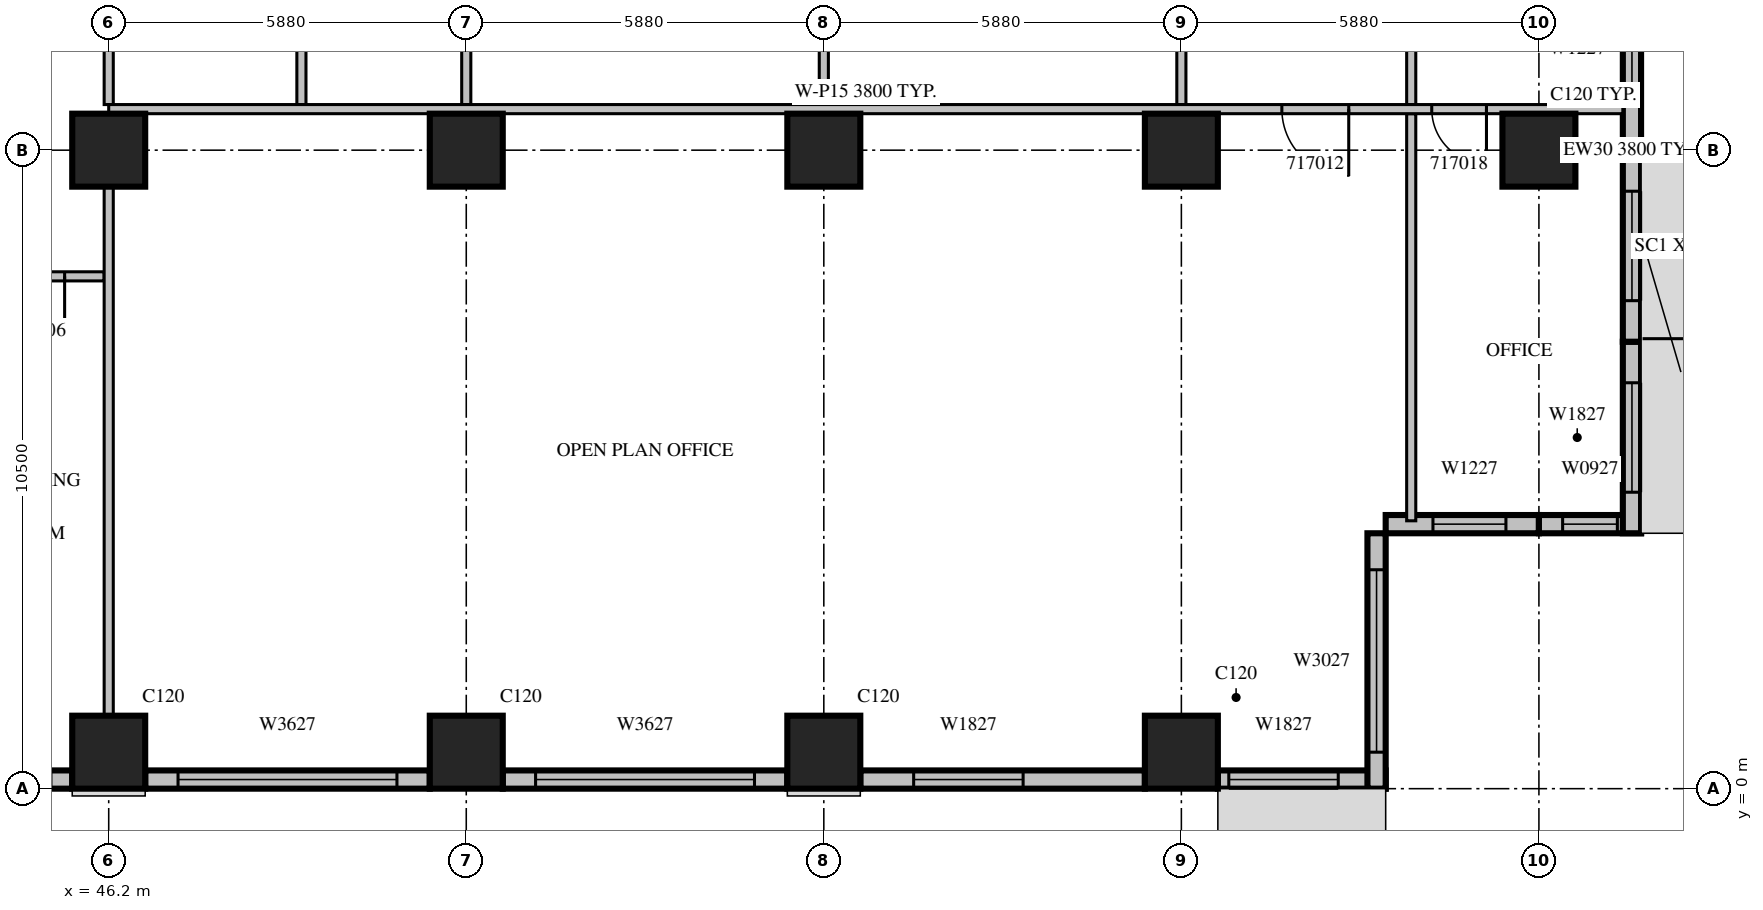
"""IFC4 building model, lengths in metres.
Left out: names, types, materials, properties, quantities, classifications, styles, units other than length and angle.
Written with IfcOpenShell. Run it as: python <this file> out.ifc"""

import sys

from ifc_helpers import new_model, si_unit, direction, frame, frame_2d, origin, origin_2d, place, context, subcontext, project, spatial, rectangle, extrude, source, transform, mapped, element, fill, save


model = new_model("IFC4")
c1 = context("Model", 3, precision=1e-05, world=origin(), true_north=direction((0.0, 1.0)))
c2 = subcontext(c1, "Body", "Model", "MODEL_VIEW")
j1 = project(units=[si_unit("LENGTHUNIT", "METRE"), si_unit("PLANEANGLEUNIT", "RADIAN")], contexts=[c1])
p1 = place(None, origin())
s1 = spatial("IfcSite", under=j1, at=p1, CompositionType="ELEMENT")
p2 = place(p1, origin())
s2 = spatial("IfcBuilding", under=s1, at=p2, CompositionType="ELEMENT")
p3 = place(p2, frame((0.0, 0.0, 82.5)))
s3 = spatial("IfcBuildingStorey", under=s2, at=p3, CompositionType="ELEMENT", Elevation=82.5)
m1 = source(origin(), c2, "Body", "SweptSolid", [
    extrude(rectangle(XDim=1.2, YDim=1.2, at=origin_2d()), origin(), (0.0, 0.0, 1.0), 4.2),
])
for number, where, z_axis, x_axis in (
    (1, (46.2, 0.6, 0.0), (0.0, 0.0, 1.0), (1.0, 0.0, 0.0)),
    (2, (52.08, 0.6, 0.0), (0.0, 0.0, 1.0), (1.0, 0.0, 0.0)),
    (3, (57.96, 0.6, 0.0), (0.0, 0.0, 1.0), (1.0, 0.0, 0.0)),
    (4, (63.84, 0.6, 0.0), (0.0, 0.0, 1.0), (1.0, 0.0, 0.0)),
    (5, (46.2, 10.5, 0.0), (0.0, 0.0, 1.0), (1.0, 0.0, 0.0)),
    (6, (52.08, 10.5, 0.0), (0.0, 0.0, 1.0), (1.0, 0.0, 0.0)),
    (7, (57.96, 10.5, 0.0), (0.0, 0.0, 1.0), (1.0, 0.0, 0.0)),
    (8, (63.84, 10.5, 0.0), (0.0, 0.0, 1.0), (1.0, 0.0, 0.0)),
    (9, (69.72, 10.5, 0.0), (0.0, 0.0, 1.0), (1.0, 0.0, 0.0)),
):
    element("IfcColumn", number, at=place(p3, frame(where, z_axis=z_axis, x_axis=x_axis)), inside=s3, PredefinedType="COLUMN", context=c2, shape_type="MappedRepresentation", body=[
        mapped(m1, transform((0.0, 0.0, 0.0), scale=1.0)),
    ])
m2 = source(origin(), c2, "Body", "SweptSolid", [
    extrude(rectangle(XDim=1.6, YDim=0.3, at=frame_2d((0.8, 0.0))), origin(), (0.0, 0.0, 1.0), 3.8),
])
p4 = place(p3, frame((44.0, 0.15, 0.0), z_axis=(0.0, 0.0, 1.0), x_axis=(1.0, 0.0, 0.0)))
e10 = element("IfcWall", 10, at=p4, inside=s3, PredefinedType="STANDARD", context=c2, shape_type="MappedRepresentation", body=[
    mapped(m2, transform((0.0, 0.0, 0.0), scale=1.0)),
])
m3 = source(origin(), c2, "Body", "SweptSolid", [
    extrude(rectangle(XDim=0.9, YDim=2.7, at=frame_2d((0.45, 1.35))), frame((0.0, 0.16, 0.0), z_axis=(0.0, -1.0, 0.0), x_axis=(1.0, 0.0, 0.0)), (0.0, 0.0, 1.0), 0.32),
])
p5 = place(p4, frame((0.35, 0.0, 0.6)))
e11 = element("IfcOpeningElement", 11, at=p5, cuts=e10, PredefinedType="OPENING", context=c2, shape_type="MappedRepresentation", body=[
    mapped(m3, transform((0.0, 0.0, 0.0), scale=1.0)),
])
m4 = source(origin(), c2, "Body", "SweptSolid", [
    extrude(rectangle(XDim=4.68, YDim=0.3, at=frame_2d((2.34, 0.0))), origin(), (0.0, 0.0, 1.0), 3.8),
])
p6 = place(p3, frame((46.8, 0.15, 0.0), z_axis=(0.0, 0.0, 1.0), x_axis=(1.0, 0.0, 0.0)))
e12 = element("IfcWall", 12, at=p6, inside=s3, PredefinedType="STANDARD", context=c2, shape_type="MappedRepresentation", body=[
    mapped(m4, transform((0.0, 0.0, 0.0), scale=1.0)),
])
m5 = source(origin(), c2, "Body", "SweptSolid", [
    extrude(rectangle(XDim=3.6, YDim=2.7, at=frame_2d((1.8, 1.35))), frame((0.0, 0.16, 0.0), z_axis=(0.0, -1.0, 0.0), x_axis=(1.0, 0.0, 0.0)), (0.0, 0.0, 1.0), 0.32),
])
p7 = place(p6, frame((0.54, 0.0, 0.6)))
e13 = element("IfcOpeningElement", 13, at=p7, cuts=e12, PredefinedType="OPENING", context=c2, shape_type="MappedRepresentation", body=[
    mapped(m5, transform((0.0, 0.0, 0.0), scale=1.0)),
])
p8 = place(p3, frame((52.68, 0.15, 0.0), z_axis=(0.0, 0.0, 1.0), x_axis=(1.0, 0.0, 0.0)))
e14 = element("IfcWall", 14, at=p8, inside=s3, PredefinedType="STANDARD", context=c2, shape_type="MappedRepresentation", body=[
    mapped(m4, transform((0.0, 0.0, 0.0), scale=1.0)),
])
p9 = place(p8, frame((0.54, 0.0, 0.6)))
e15 = element("IfcOpeningElement", 15, at=p9, cuts=e14, PredefinedType="OPENING", context=c2, shape_type="MappedRepresentation", body=[
    mapped(m5, transform((0.0, 0.0, 0.0), scale=1.0)),
])
p10 = place(p3, frame((58.56, 0.15, 0.0), z_axis=(0.0, 0.0, 1.0), x_axis=(1.0, 0.0, 0.0)))
e16 = element("IfcWall", 16, at=p10, inside=s3, PredefinedType="STANDARD", context=c2, shape_type="MappedRepresentation", body=[
    mapped(m4, transform((0.0, 0.0, 0.0), scale=1.0)),
])
m6 = source(origin(), c2, "Body", "SweptSolid", [
    extrude(rectangle(XDim=1.8, YDim=2.7, at=frame_2d((0.9, 1.35))), frame((0.0, 0.16, 0.0), z_axis=(0.0, -1.0, 0.0), x_axis=(1.0, 0.0, 0.0)), (0.0, 0.0, 1.0), 0.32),
])
p11 = place(p10, frame((0.877, 0.0, 0.6)))
e17 = element("IfcOpeningElement", 17, at=p11, cuts=e16, PredefinedType="OPENING", context=c2, shape_type="MappedRepresentation", body=[
    mapped(m6, transform((0.0, 0.0, 0.0), scale=1.0)),
])
m7 = source(origin(), c2, "Body", "SweptSolid", [
    extrude(rectangle(XDim=2.76, YDim=0.3, at=frame_2d((1.38, 0.0))), origin(), (0.0, 0.0, 1.0), 3.8),
])
p12 = place(p3, frame((64.44, 0.15, 0.0), z_axis=(0.0, 0.0, 1.0), x_axis=(1.0, 0.0, 0.0)))
e18 = element("IfcWall", 18, at=p12, inside=s3, PredefinedType="STANDARD", context=c2, shape_type="MappedRepresentation", body=[
    mapped(m7, transform((0.0, 0.0, 0.0), scale=1.0)),
])
p13 = place(p12, frame((0.18, 0.0, 0.6)))
e19 = element("IfcOpeningElement", 19, at=p13, cuts=e18, PredefinedType="OPENING", context=c2, shape_type="MappedRepresentation", body=[
    mapped(m6, transform((0.0, 0.0, 0.0), scale=1.0)),
])
m8 = source(origin(), c2, "Body", "SweptSolid", [
    extrude(rectangle(XDim=4.2, YDim=0.3, at=frame_2d((2.1, 0.0))), origin(), (0.0, 0.0, 1.0), 3.8),
])
p14 = place(p3, frame((67.05, 0.0, 0.0), z_axis=(0.0, 0.0, 1.0), x_axis=(0.0, 1.0, 0.0)))
e20 = element("IfcWall", 20, at=p14, inside=s3, PredefinedType="STANDARD", context=c2, shape_type="MappedRepresentation", body=[
    mapped(m8, transform((0.0, 0.0, 0.0), scale=1.0)),
])
m9 = source(origin(), c2, "Body", "SweptSolid", [
    extrude(rectangle(XDim=3.0, YDim=2.7, at=frame_2d((1.5, 1.35))), frame((0.0, 0.16, 0.0), z_axis=(0.0, -1.0, 0.0), x_axis=(1.0, 0.0, 0.0)), (0.0, 0.0, 1.0), 0.32),
])
p15 = place(p14, frame((0.6, 0.0, 0.6)))
e21 = element("IfcOpeningElement", 21, at=p15, cuts=e20, PredefinedType="OPENING", context=c2, shape_type="MappedRepresentation", body=[
    mapped(m9, transform((0.0, 0.0, 0.0), scale=1.0)),
])
m10 = source(origin(), c2, "Body", "SweptSolid", [
    extrude(rectangle(XDim=2.52, YDim=0.3, at=frame_2d((1.26, 0.0))), origin(), (0.0, 0.0, 1.0), 3.8),
])
p16 = place(p3, frame((67.2, 4.35, 0.0), z_axis=(0.0, 0.0, 1.0), x_axis=(1.0, 0.0, 0.0)))
e22 = element("IfcWall", 22, at=p16, inside=s3, PredefinedType="STANDARD", context=c2, shape_type="MappedRepresentation", body=[
    mapped(m10, transform((0.0, 0.0, 0.0), scale=1.0)),
])
m11 = source(origin(), c2, "Body", "SweptSolid", [
    extrude(rectangle(XDim=1.2, YDim=2.7, at=frame_2d((0.6, 1.35))), frame((0.0, 0.16, 0.0), z_axis=(0.0, -1.0, 0.0), x_axis=(1.0, 0.0, 0.0)), (0.0, 0.0, 1.0), 0.32),
])
p17 = place(p16, frame((0.777, 0.0, 0.6)))
e23 = element("IfcOpeningElement", 23, at=p17, cuts=e22, PredefinedType="OPENING", context=c2, shape_type="MappedRepresentation", body=[
    mapped(m11, transform((0.0, 0.0, 0.0), scale=1.0)),
])
m12 = source(origin(), c2, "Body", "SweptSolid", [
    extrude(rectangle(XDim=1.68, YDim=0.3, at=frame_2d((0.84, 0.0))), origin(), (0.0, 0.0, 1.0), 3.8),
])
p18 = place(p3, frame((69.72, 4.35, 0.0), z_axis=(0.0, 0.0, 1.0), x_axis=(1.0, 0.0, 0.0)))
e24 = element("IfcWall", 24, at=p18, inside=s3, PredefinedType="STANDARD", context=c2, shape_type="MappedRepresentation", body=[
    mapped(m12, transform((0.0, 0.0, 0.0), scale=1.0)),
])
p19 = place(p18, frame((0.39, 0.0, 0.6)))
e25 = element("IfcOpeningElement", 25, at=p19, cuts=e24, PredefinedType="OPENING", context=c2, shape_type="MappedRepresentation", body=[
    mapped(m3, transform((0.0, 0.0, 0.0), scale=1.0)),
])
m13 = source(origin(), c2, "Body", "SweptSolid", [
    extrude(rectangle(XDim=3.15, YDim=0.3, at=frame_2d((1.575, 0.0))), origin(), (0.0, 0.0, 1.0), 3.8),
])
p20 = place(p3, frame((71.25, 4.2, 0.0), z_axis=(0.0, 0.0, 1.0), x_axis=(0.0, 1.0, 0.0)))
e26 = element("IfcWall", 26, at=p20, inside=s3, PredefinedType="STANDARD", context=c2, shape_type="MappedRepresentation", body=[
    mapped(m13, transform((0.0, 0.0, 0.0), scale=1.0)),
])
p21 = place(p20, frame((0.675, 0.0, 0.6)))
e27 = element("IfcOpeningElement", 27, at=p21, cuts=e26, PredefinedType="OPENING", context=c2, shape_type="MappedRepresentation", body=[
    mapped(m6, transform((0.0, 0.0, 0.0), scale=1.0)),
])
p22 = place(p3, frame((71.25, 7.35, 0.0), z_axis=(0.0, 0.0, 1.0), x_axis=(0.0, 1.0, 0.0)))
e28 = element("IfcWall", 28, at=p22, inside=s3, PredefinedType="STANDARD", context=c2, shape_type="MappedRepresentation", body=[
    mapped(m13, transform((0.0, 0.0, 0.0), scale=1.0)),
])
m14 = source(origin(), c2, "Body", "SweptSolid", [
    extrude(rectangle(XDim=1.8, YDim=2.4, at=frame_2d((0.9, 1.2))), frame((0.0, 0.16, 0.0), z_axis=(0.0, -1.0, 0.0), x_axis=(1.0, 0.0, 0.0)), (0.0, 0.0, 1.0), 0.32),
])
p23 = place(p22, frame((0.675, 0.0, 0.0)))
e29 = element("IfcOpeningElement", 29, at=p23, cuts=e28, PredefinedType="OPENING", context=c2, shape_type="MappedRepresentation", body=[
    mapped(m14, transform((0.0, 0.0, 0.0), scale=1.0)),
])
m15 = source(origin(), c2, "Body", "SweptSolid", [
    extrude(rectangle(XDim=6.3, YDim=0.3, at=frame_2d((3.15, 0.0))), origin(), (0.0, 0.0, 1.0), 3.8),
])
p24 = place(p3, frame((71.25, 10.5, 0.0), z_axis=(0.0, 0.0, 1.0), x_axis=(0.0, 1.0, 0.0)))
e30 = element("IfcWall", 30, at=p24, inside=s3, PredefinedType="STANDARD", context=c2, shape_type="MappedRepresentation", body=[
    mapped(m15, transform((0.0, 0.0, 0.0), scale=1.0)),
])
p25 = place(p24, frame((1.062, 0.0, 0.6)))
e31 = element("IfcOpeningElement", 31, at=p25, cuts=e30, PredefinedType="OPENING", context=c2, shape_type="MappedRepresentation", body=[
    mapped(m11, transform((0.0, 0.0, 0.0), scale=1.0)),
])
m16 = source(origin(), c2, "Body", "SweptSolid", [
    extrude(rectangle(XDim=2.2, YDim=0.15, at=frame_2d((1.1, 0.0))), origin(), (0.0, 0.0, 1.0), 3.8),
])
p26 = place(p3, frame((46.125, 8.425, 0.0), z_axis=(0.0, 0.0, 1.0), x_axis=(-1.0, 0.0, 0.0)))
e32 = element("IfcWall", 32, at=p26, inside=s3, PredefinedType="PARTITIONING", context=c2, shape_type="MappedRepresentation", body=[
    mapped(m16, transform((0.0, 0.0, 0.0), scale=1.0)),
])
m17 = source(origin(), c2, "Body", "SweptSolid", [
    extrude(rectangle(XDim=0.9, YDim=2.1, at=frame_2d((0.45, 1.05))), frame((0.0, 0.085, 0.0), z_axis=(0.0, -1.0, 0.0), x_axis=(1.0, 0.0, 0.0)), (0.0, 0.0, 1.0), 0.17),
])
p27 = place(p26, frame((0.65, 0.0, 0.0)))
e33 = element("IfcOpeningElement", 33, at=p27, cuts=e32, PredefinedType="OPENING", context=c2, shape_type="MappedRepresentation", body=[
    mapped(m17, transform((0.0, 0.0, 0.0), scale=1.0)),
])
m18 = source(origin(), c2, "Body", "SweptSolid", [
    extrude(rectangle(XDim=3.45, YDim=0.15, at=frame_2d((1.725, 0.0))), origin(), (0.0, 0.0, 1.0), 3.8),
])
for number, where, z_axis, x_axis in (
    (34, (49.369, 11.25, 0.0), (0.0, 0.0, 1.0), (0.0, 1.0, 0.0)),
    (35, (52.08, 11.25, 0.0), (0.0, 0.0, 1.0), (0.0, 1.0, 0.0)),
    (36, (57.96, 11.25, 0.0), (0.0, 0.0, 1.0), (0.0, 1.0, 0.0)),
    (37, (63.84, 11.25, 0.0), (0.0, 0.0, 1.0), (0.0, 1.0, 0.0)),
):
    element("IfcWall", number, at=place(p3, frame(where, z_axis=z_axis, x_axis=x_axis)), inside=s3, PredefinedType="PARTITIONING", context=c2, shape_type="MappedRepresentation", body=[
        mapped(m18, transform((0.0, 0.0, 0.0), scale=1.0)),
    ])
m19 = source(origin(), c2, "Body", "SweptSolid", [
    extrude(rectangle(XDim=8.702, YDim=0.15, at=frame_2d((4.351, 0.0))), origin(), (0.0, 0.0, 1.0), 3.8),
])
p28 = place(p3, frame((46.2, 1.199, 0.0), z_axis=(0.0, 0.0, 1.0), x_axis=(0.0, 1.0, 0.0)))
e38 = element("IfcWall", 38, at=p28, inside=s3, PredefinedType="PARTITIONING", context=c2, shape_type="MappedRepresentation", body=[
    mapped(m19, transform((0.0, 0.0, 0.0), scale=1.0)),
])
p29 = place(p3, frame((46.2, 11.25, 0.0), z_axis=(0.0, 0.0, 1.0), x_axis=(0.0, 1.0, 0.0)))
e39 = element("IfcWall", 39, at=p29, inside=s3, PredefinedType="PARTITIONING", context=c2, shape_type="MappedRepresentation", body=[
    mapped(m18, transform((0.0, 0.0, 0.0), scale=1.0)),
])
m20 = source(origin(), c2, "Body", "SweptSolid", [
    extrude(rectangle(XDim=6.695, YDim=0.15, at=frame_2d((3.348, 0.0))), origin(), (0.0, 0.0, 1.0), 3.8),
])
p30 = place(p3, frame((67.62, 4.405, 0.0), z_axis=(0.0, 0.0, 1.0), x_axis=(0.0, 1.0, 0.0)))
e40 = element("IfcWall", 40, at=p30, inside=s3, PredefinedType="PARTITIONING", context=c2, shape_type="MappedRepresentation", body=[
    mapped(m20, transform((0.0, 0.0, 0.0), scale=1.0)),
])
p31 = place(p3, frame((67.62, 11.25, 0.0), z_axis=(0.0, 0.0, 1.0), x_axis=(0.0, 1.0, 0.0)))
e41 = element("IfcWall", 41, at=p31, inside=s3, PredefinedType="PARTITIONING", context=c2, shape_type="MappedRepresentation", body=[
    mapped(m18, transform((0.0, 0.0, 0.0), scale=1.0)),
])
m21 = source(origin(), c2, "Body", "SweptSolid", [
    extrude(rectangle(XDim=24.9, YDim=0.15, at=frame_2d((12.45, 0.0))), origin(), (0.0, 0.0, 1.0), 3.8),
])
p32 = place(p3, frame((71.1, 11.175, 0.0), z_axis=(0.0, 0.0, 1.0), x_axis=(-1.0, 0.0, 0.0)))
e42 = element("IfcWall", 42, at=p32, inside=s3, PredefinedType="PARTITIONING", context=c2, shape_type="MappedRepresentation", body=[
    mapped(m21, transform((0.0, 0.0, 0.0), scale=1.0)),
])
m22 = source(origin(), c2, "Body", "SweptSolid", [
    extrude(rectangle(XDim=1.1, YDim=2.1, at=frame_2d((0.55, 1.05))), frame((0.0, 0.085, 0.0), z_axis=(0.0, -1.0, 0.0), x_axis=(1.0, 0.0, 0.0)), (0.0, 0.0, 1.0), 0.17),
])
p33 = place(p32, frame((4.508, 0.0, 0.0)))
e43 = element("IfcOpeningElement", 43, at=p33, cuts=e42, PredefinedType="OPENING", context=c2, shape_type="MappedRepresentation", body=[
    mapped(m22, transform((0.0, 0.0, 0.0), scale=1.0)),
])
p34 = place(p32, frame((2.243, 0.0, 0.0)))
e44 = element("IfcOpeningElement", 44, at=p34, cuts=e42, PredefinedType="OPENING", context=c2, shape_type="MappedRepresentation", body=[
    mapped(m17, transform((0.0, 0.0, 0.0), scale=1.0)),
])
m23 = source(origin(), c2, "Body", "SweptSolid", [
    extrude(rectangle(XDim=3.6, YDim=2.7, at=frame_2d((1.8, 1.35))), frame((0.0, 0.03, 0.0), z_axis=(0.0, -1.0, 0.0), x_axis=(1.0, 0.0, 0.0)), (0.0, 0.0, 1.0), 0.06),
])
p35 = place(p7, origin())
e45 = element("IfcWindow", 45, at=p35, inside=s3, PartitioningType="SINGLE_PANEL", PredefinedType="WINDOW", context=c2, shape_type="MappedRepresentation", body=[
    mapped(m23, transform((0.0, 0.0, 0.0), scale=1.0)),
])
fill(e13, e45)
p36 = place(p9, origin())
e46 = element("IfcWindow", 46, at=p36, inside=s3, PartitioningType="SINGLE_PANEL", PredefinedType="WINDOW", context=c2, shape_type="MappedRepresentation", body=[
    mapped(m23, transform((0.0, 0.0, 0.0), scale=1.0)),
])
fill(e15, e46)
m24 = source(origin(), c2, "Body", "SweptSolid", [
    extrude(rectangle(XDim=1.8, YDim=2.7, at=frame_2d((0.9, 1.35))), frame((0.0, 0.03, 0.0), z_axis=(0.0, -1.0, 0.0), x_axis=(1.0, 0.0, 0.0)), (0.0, 0.0, 1.0), 0.06),
])
p37 = place(p11, origin())
e47 = element("IfcWindow", 47, at=p37, inside=s3, PartitioningType="SINGLE_PANEL", PredefinedType="WINDOW", context=c2, shape_type="MappedRepresentation", body=[
    mapped(m24, transform((0.0, 0.0, 0.0), scale=1.0)),
])
fill(e17, e47)
p38 = place(p13, origin())
e48 = element("IfcWindow", 48, at=p38, inside=s3, PartitioningType="SINGLE_PANEL", PredefinedType="WINDOW", context=c2, shape_type="MappedRepresentation", body=[
    mapped(m24, transform((0.0, 0.0, 0.0), scale=1.0)),
])
fill(e19, e48)
m25 = source(origin(), c2, "Body", "SweptSolid", [
    extrude(rectangle(XDim=3.0, YDim=2.7, at=frame_2d((1.5, 1.35))), frame((0.0, 0.03, 0.0), z_axis=(0.0, -1.0, 0.0), x_axis=(1.0, 0.0, 0.0)), (0.0, 0.0, 1.0), 0.06),
])
p39 = place(p15, origin())
e49 = element("IfcWindow", 49, at=p39, inside=s3, PartitioningType="SINGLE_PANEL", PredefinedType="WINDOW", context=c2, shape_type="MappedRepresentation", body=[
    mapped(m25, transform((0.0, 0.0, 0.0), scale=1.0)),
])
fill(e21, e49)
m26 = source(origin(), c2, "Body", "SweptSolid", [
    extrude(rectangle(XDim=1.2, YDim=2.7, at=frame_2d((0.6, 1.35))), frame((0.0, 0.03, 0.0), z_axis=(0.0, -1.0, 0.0), x_axis=(1.0, 0.0, 0.0)), (0.0, 0.0, 1.0), 0.06),
])
p40 = place(p17, origin())
e50 = element("IfcWindow", 50, at=p40, inside=s3, PartitioningType="SINGLE_PANEL", PredefinedType="WINDOW", context=c2, shape_type="MappedRepresentation", body=[
    mapped(m26, transform((0.0, 0.0, 0.0), scale=1.0)),
])
fill(e23, e50)
m27 = source(origin(), c2, "Body", "SweptSolid", [
    extrude(rectangle(XDim=0.9, YDim=2.7, at=frame_2d((0.45, 1.35))), frame((0.0, 0.03, 0.0), z_axis=(0.0, -1.0, 0.0), x_axis=(1.0, 0.0, 0.0)), (0.0, 0.0, 1.0), 0.06),
])
p41 = place(p19, origin())
e51 = element("IfcWindow", 51, at=p41, inside=s3, PartitioningType="SINGLE_PANEL", PredefinedType="WINDOW", context=c2, shape_type="MappedRepresentation", body=[
    mapped(m27, transform((0.0, 0.0, 0.0), scale=1.0)),
])
fill(e25, e51)
p42 = place(p21, origin())
e52 = element("IfcWindow", 52, at=p42, inside=s3, PartitioningType="SINGLE_PANEL", PredefinedType="WINDOW", context=c2, shape_type="MappedRepresentation", body=[
    mapped(m24, transform((0.0, 0.0, 0.0), scale=1.0)),
])
fill(e27, e52)
m28 = source(origin(), c2, "Body", "SweptSolid", [
    extrude(rectangle(XDim=1.8, YDim=2.4, at=frame_2d((0.9, 1.2))), frame((0.0, 0.025, 0.0), z_axis=(0.0, -1.0, 0.0), x_axis=(1.0, 0.0, 0.0)), (0.0, 0.0, 1.0), 0.05),
])
p43 = place(p23, origin())
e53 = element("IfcDoor", 53, at=p43, inside=s3, OperationType="SLIDING_TO_LEFT", PredefinedType="DOOR", context=c2, shape_type="MappedRepresentation", body=[
    mapped(m28, transform((0.0, 0.0, 0.0), scale=1.0)),
])
fill(e29, e53)
p44 = place(p25, origin())
e54 = element("IfcWindow", 54, at=p44, inside=s3, PartitioningType="SINGLE_PANEL", PredefinedType="WINDOW", context=c2, shape_type="MappedRepresentation", body=[
    mapped(m26, transform((0.0, 0.0, 0.0), scale=1.0)),
])
fill(e31, e54)
m29 = source(origin(), c2, "Body", "SweptSolid", [
    extrude(rectangle(XDim=0.9, YDim=2.1, at=frame_2d((0.45, 1.05))), frame((0.0, 0.025, 0.0), z_axis=(0.0, -1.0, 0.0), x_axis=(1.0, 0.0, 0.0)), (0.0, 0.0, 1.0), 0.05),
])
p45 = place(p27, origin())
e55 = element("IfcDoor", 55, at=p45, inside=s3, OperationType="SINGLE_SWING_LEFT", PredefinedType="DOOR", context=c2, shape_type="MappedRepresentation", body=[
    mapped(m29, transform((0.0, 0.0, 0.0), scale=1.0)),
])
fill(e33, e55)
m30 = source(origin(), c2, "Body", "SweptSolid", [
    extrude(rectangle(XDim=1.1, YDim=2.1, at=frame_2d((0.55, 1.05))), frame((0.0, 0.025, 0.0), z_axis=(0.0, -1.0, 0.0), x_axis=(1.0, 0.0, 0.0)), (0.0, 0.0, 1.0), 0.05),
])
p46 = place(p33, origin())
e56 = element("IfcDoor", 56, at=p46, inside=s3, OperationType="SINGLE_SWING_LEFT", PredefinedType="DOOR", context=c2, shape_type="MappedRepresentation", body=[
    mapped(m30, transform((0.0, 0.0, 0.0), scale=1.0)),
])
fill(e43, e56)
p47 = place(p34, origin())
e57 = element("IfcDoor", 57, at=p47, inside=s3, OperationType="SINGLE_SWING_LEFT", PredefinedType="DOOR", context=c2, shape_type="MappedRepresentation", body=[
    mapped(m29, transform((0.0, 0.0, 0.0), scale=1.0)),
])
fill(e44, e57)
save(model, sys.argv[1])
